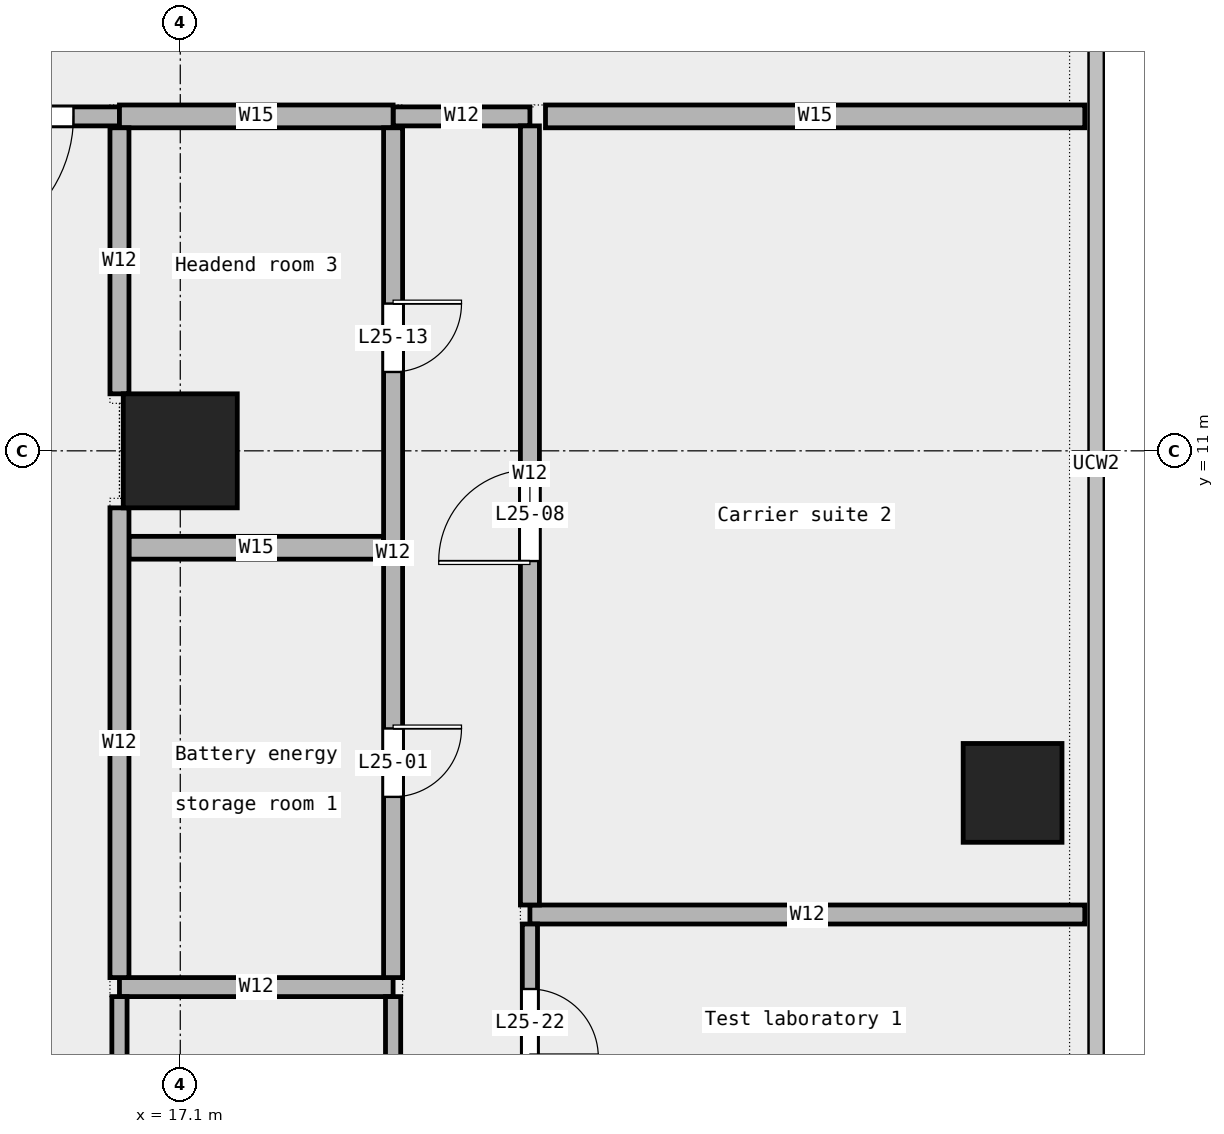
"""IFC4 building model, lengths in metres.
Left out: names, types, materials, properties, quantities, classifications, styles, units other than length and angle.
Written with IfcOpenShell. Run it as: python <this file> out.ifc"""

import sys

from ifc_helpers import new_model, si_unit, direction, frame, frame_2d, origin, origin_2d, place, context, subcontext, project, spatial, rectangle, extrude, element, fill, save


model = new_model("IFC4")
c1 = context("Model", 3, precision=1e-05, world=origin(), true_north=direction((0.0, 1.0)))
c2 = subcontext(c1, "Body", "Model", "MODEL_VIEW")
j1 = project(units=[si_unit("LENGTHUNIT", "METRE"), si_unit("PLANEANGLEUNIT", "RADIAN")], contexts=[c1])
p1 = place(None, origin())
s1 = spatial("IfcSite", under=j1, at=p1, CompositionType="ELEMENT")
p2 = place(p1, origin())
s2 = spatial("IfcBuilding", under=s1, at=p2, CompositionType="ELEMENT")
p3 = place(p2, frame((0.0, 0.0, 126.1)))
s3 = spatial("IfcBuildingStorey", under=s2, at=p3, CompositionType="ELEMENT", Elevation=126.1)
p4 = place(p3, frame((28.05, 6.5, 0.0), z_axis=(0.0, 0.0, 1.0), x_axis=(1.0, 0.0, 0.0)))
e1 = element("IfcColumn", 1, at=p4, inside=s3, PredefinedType="COLUMN", context=c2, shape_type="SweptSolid", body=[
    extrude(rectangle(XDim=1.3, YDim=1.3, at=origin_2d()), origin(), (0.0, 0.0, 1.0), 4.05),
])
p5 = place(p3, frame((17.1, 11.0, 0.0), z_axis=(0.0, 0.0, 1.0), x_axis=(1.0, 0.0, 0.0)))
e2 = element("IfcColumn", 2, at=p5, inside=s3, PredefinedType="COLUMN", context=c2, shape_type="SweptSolid", body=[
    extrude(rectangle(XDim=1.5, YDim=1.5, at=origin_2d()), origin(), (0.0, 0.0, 1.0), 4.05),
])
p6 = place(p3, frame((16.3, 3.945, 0.0), z_axis=(0.0, 0.0, 1.0), x_axis=(1.0, 0.0, 0.0)))
e3 = element("IfcWall", 3, at=p6, inside=s3, PredefinedType="PARTITIONING", context=c2, shape_type="SweptSolid", body=[
    extrude(rectangle(XDim=3.6, YDim=0.25, at=frame_2d((1.8, 0.0))), origin(), (0.0, 0.0, 1.0), 4.05),
])
p7 = place(p3, frame((21.7, 4.9, 0.0), z_axis=(0.0, 0.0, 1.0), x_axis=(1.0, 0.0, 0.0)))
e4 = element("IfcWall", 4, at=p7, inside=s3, PredefinedType="PARTITIONING", context=c2, shape_type="SweptSolid", body=[
    extrude(rectangle(XDim=7.3, YDim=0.25, at=frame_2d((3.65, 0.0))), origin(), (0.0, 0.0, 1.0), 4.05),
])
p8 = place(p3, frame((16.425, 9.725, 0.0), z_axis=(0.0, 0.0, 1.0), x_axis=(1.0, 0.0, 0.0)))
e5 = element("IfcWall", 5, at=p8, inside=s3, PredefinedType="PARTITIONING", context=c2, shape_type="SweptSolid", body=[
    extrude(rectangle(XDim=3.35, YDim=0.3, at=frame_2d((1.675, 0.0))), origin(), (0.0, 0.0, 1.0), 4.05),
])
p9 = place(p3, frame((13.29, 15.4, 0.0), z_axis=(0.0, 0.0, 1.0), x_axis=(1.0, 0.0, 0.0)))
e6 = element("IfcWall", 6, at=p9, inside=s3, PredefinedType="PARTITIONING", context=c2, shape_type="SweptSolid", body=[
    extrude(rectangle(XDim=3.01, YDim=0.25, at=frame_2d((1.505, 0.0))), origin(), (0.0, 0.0, 1.0), 4.05),
])
p10 = place(p9, frame((0.605, 0.0, 0.0)))
e7 = element("IfcOpeningElement", 7, at=p10, cuts=e6, PredefinedType="OPENING", context=c2, shape_type="SweptSolid", body=[
    extrude(rectangle(XDim=1.8, YDim=2.1, at=frame_2d((0.9, 1.05))), frame((0.0, 0.137, 0.0), z_axis=(0.0, -1.0, 0.0), x_axis=(1.0, 0.0, 0.0)), (0.0, 0.0, 1.0), 0.274),
])
p11 = place(p3, frame((19.9, 15.4, 0.0), z_axis=(0.0, 0.0, 1.0), x_axis=(1.0, 0.0, 0.0)))
e8 = element("IfcWall", 8, at=p11, inside=s3, PredefinedType="PARTITIONING", context=c2, shape_type="SweptSolid", body=[
    extrude(rectangle(XDim=1.8, YDim=0.25, at=frame_2d((0.9, 0.0))), origin(), (0.0, 0.0, 1.0), 4.05),
])
p12 = place(p3, frame((16.3, 15.4, 0.0), z_axis=(0.0, 0.0, 1.0), x_axis=(1.0, 0.0, 0.0)))
e9 = element("IfcWall", 9, at=p12, inside=s3, PredefinedType="PARTITIONING", context=c2, shape_type="SweptSolid", body=[
    extrude(rectangle(XDim=3.6, YDim=0.3, at=frame_2d((1.8, 0.0))), origin(), (0.0, 0.0, 1.0), 4.05),
])
p13 = place(p3, frame((21.905, 15.4, 0.0), z_axis=(0.0, 0.0, 1.0), x_axis=(1.0, 0.0, 0.0)))
e10 = element("IfcWall", 10, at=p13, inside=s3, PredefinedType="PARTITIONING", context=c2, shape_type="SweptSolid", body=[
    extrude(rectangle(XDim=7.095, YDim=0.3, at=frame_2d((3.547, 0.0))), origin(), (0.0, 0.0, 1.0), 4.05),
])
p14 = place(p3, frame((16.3, 0.75, 0.0), z_axis=(0.0, 0.0, 1.0), x_axis=(0.0, 1.0, 0.0)))
e11 = element("IfcWall", 11, at=p14, inside=s3, PredefinedType="PARTITIONING", context=c2, shape_type="SweptSolid", body=[
    extrude(rectangle(XDim=3.07, YDim=0.2, at=frame_2d((1.535, 0.0))), origin(), (0.0, 0.0, 1.0), 4.05),
])
p15 = place(p3, frame((16.3, 4.07, 0.0), z_axis=(0.0, 0.0, 1.0), x_axis=(0.0, 1.0, 0.0)))
e12 = element("IfcWall", 12, at=p15, inside=s3, PredefinedType="PARTITIONING", context=c2, shape_type="SweptSolid", body=[
    extrude(rectangle(XDim=6.18, YDim=0.25, at=frame_2d((3.09, 0.0))), origin(), (0.0, 0.0, 1.0), 4.05),
])
p16 = place(p3, frame((16.3, 11.75, 0.0), z_axis=(0.0, 0.0, 1.0), x_axis=(0.0, 1.0, 0.0)))
e13 = element("IfcWall", 13, at=p16, inside=s3, PredefinedType="PARTITIONING", context=c2, shape_type="SweptSolid", body=[
    extrude(rectangle(XDim=3.5, YDim=0.25, at=frame_2d((1.75, 0.0))), origin(), (0.0, 0.0, 1.0), 4.05),
])
p17 = place(p3, frame((19.9, -0.775, 0.0), z_axis=(0.0, 0.0, 1.0), x_axis=(0.0, 1.0, 0.0)))
e14 = element("IfcWall", 14, at=p17, inside=s3, PredefinedType="PARTITIONING", context=c2, shape_type="SweptSolid", body=[
    extrude(rectangle(XDim=4.595, YDim=0.2, at=frame_2d((2.297, 0.0))), origin(), (0.0, 0.0, 1.0), 4.05),
])
p18 = place(p17, frame((1.847, 0.0, 0.0)))
e15 = element("IfcOpeningElement", 15, at=p18, cuts=e14, PredefinedType="OPENING", context=c2, shape_type="SweptSolid", body=[
    extrude(rectangle(XDim=0.9, YDim=2.1, at=frame_2d((0.45, 1.05))), frame((0.0, 0.112, 0.0), z_axis=(0.0, -1.0, 0.0), x_axis=(1.0, 0.0, 0.0)), (0.0, 0.0, 1.0), 0.224),
])
p19 = place(p3, frame((19.9, 4.07, 0.0), z_axis=(0.0, 0.0, 1.0), x_axis=(0.0, 1.0, 0.0)))
e16 = element("IfcWall", 16, at=p19, inside=s3, PredefinedType="PARTITIONING", context=c2, shape_type="SweptSolid", body=[
    extrude(rectangle(XDim=11.18, YDim=0.25, at=frame_2d((5.59, 0.0))), origin(), (0.0, 0.0, 1.0), 4.05),
])
p20 = place(p19, frame((2.377, 0.0, 0.0)))
e17 = element("IfcOpeningElement", 17, at=p20, cuts=e16, PredefinedType="OPENING", context=c2, shape_type="SweptSolid", body=[
    extrude(rectangle(XDim=0.9, YDim=2.1, at=frame_2d((0.45, 1.05))), frame((0.0, 0.137, 0.0), z_axis=(0.0, -1.0, 0.0), x_axis=(1.0, 0.0, 0.0)), (0.0, 0.0, 1.0), 0.274),
])
p21 = place(p19, frame((7.968, 0.0, 0.0)))
e18 = element("IfcOpeningElement", 18, at=p21, cuts=e16, PredefinedType="OPENING", context=c2, shape_type="SweptSolid", body=[
    extrude(rectangle(XDim=0.9, YDim=2.1, at=frame_2d((0.45, 1.05))), frame((0.0, 0.137, 0.0), z_axis=(0.0, -1.0, 0.0), x_axis=(1.0, 0.0, 0.0)), (0.0, 0.0, 1.0), 0.274),
])
p22 = place(p3, frame((21.7, -9.0, 0.0), z_axis=(0.0, 0.0, 1.0), x_axis=(0.0, 1.0, 0.0)))
e19 = element("IfcWall", 19, at=p22, inside=s3, PredefinedType="PARTITIONING", context=c2, shape_type="SweptSolid", body=[
    extrude(rectangle(XDim=13.775, YDim=0.2, at=frame_2d((6.887, 0.0))), origin(), (0.0, 0.0, 1.0), 4.05),
])
p23 = place(p22, frame((4.833, 0.0, 0.0)))
e20 = element("IfcOpeningElement", 20, at=p23, cuts=e19, PredefinedType="OPENING", context=c2, shape_type="SweptSolid", body=[
    extrude(rectangle(XDim=1.5, YDim=2.1, at=frame_2d((0.75, 1.05))), frame((0.0, 0.112, 0.0), z_axis=(0.0, -1.0, 0.0), x_axis=(1.0, 0.0, 0.0)), (0.0, 0.0, 1.0), 0.224),
])
p24 = place(p22, frame((12.02, 0.0, 0.0)))
e21 = element("IfcOpeningElement", 21, at=p24, cuts=e19, PredefinedType="OPENING", context=c2, shape_type="SweptSolid", body=[
    extrude(rectangle(XDim=0.9, YDim=2.1, at=frame_2d((0.45, 1.05))), frame((0.0, 0.112, 0.0), z_axis=(0.0, -1.0, 0.0), x_axis=(1.0, 0.0, 0.0)), (0.0, 0.0, 1.0), 0.224),
])
p25 = place(p3, frame((21.7, 5.025, 0.0), z_axis=(0.0, 0.0, 1.0), x_axis=(0.0, 1.0, 0.0)))
e22 = element("IfcWall", 22, at=p25, inside=s3, PredefinedType="PARTITIONING", context=c2, shape_type="SweptSolid", body=[
    extrude(rectangle(XDim=10.25, YDim=0.25, at=frame_2d((5.125, 0.0))), origin(), (0.0, 0.0, 1.0), 4.05),
])
p26 = place(p25, frame((4.525, 0.0, 0.0)))
e23 = element("IfcOpeningElement", 23, at=p26, cuts=e22, PredefinedType="OPENING", context=c2, shape_type="SweptSolid", body=[
    extrude(rectangle(XDim=1.2, YDim=2.1, at=frame_2d((0.6, 1.05))), frame((0.0, 0.137, 0.0), z_axis=(0.0, -1.0, 0.0), x_axis=(1.0, 0.0, 0.0)), (0.0, 0.0, 1.0), 0.274),
])
p27 = place(p20, origin())
e24 = element("IfcDoor", 24, at=p27, inside=s3, OperationType="SINGLE_SWING_LEFT", PredefinedType="DOOR", context=c2, shape_type="SweptSolid", body=[
    extrude(rectangle(XDim=0.9, YDim=2.1, at=frame_2d((0.45, 1.05))), frame((0.0, 0.025, 0.0), z_axis=(0.0, -1.0, 0.0), x_axis=(1.0, 0.0, 0.0)), (0.0, 0.0, 1.0), 0.05),
])
fill(e17, e24)
p28 = place(p26, origin())
e25 = element("IfcDoor", 25, at=p28, inside=s3, OperationType="SINGLE_SWING_LEFT", PredefinedType="DOOR", context=c2, shape_type="SweptSolid", body=[
    extrude(rectangle(XDim=1.2, YDim=2.1, at=frame_2d((0.6, 1.05))), frame((0.0, 0.025, 0.0), z_axis=(0.0, -1.0, 0.0), x_axis=(1.0, 0.0, 0.0)), (0.0, 0.0, 1.0), 0.05),
])
fill(e23, e25)
p29 = place(p21, origin())
e26 = element("IfcDoor", 26, at=p29, inside=s3, OperationType="SINGLE_SWING_LEFT", PredefinedType="DOOR", context=c2, shape_type="SweptSolid", body=[
    extrude(rectangle(XDim=0.9, YDim=2.1, at=frame_2d((0.45, 1.05))), frame((0.0, 0.025, 0.0), z_axis=(0.0, -1.0, 0.0), x_axis=(1.0, 0.0, 0.0)), (0.0, 0.0, 1.0), 0.05),
])
fill(e18, e26)
p30 = place(p10, origin())
e27 = element("IfcDoor", 27, at=p30, inside=s3, OperationType="DOUBLE_DOOR_SINGLE_SWING", PredefinedType="DOOR", context=c2, shape_type="SweptSolid", body=[
    extrude(rectangle(XDim=1.8, YDim=2.1, at=frame_2d((0.9, 1.05))), frame((0.0, 0.025, 0.0), z_axis=(0.0, -1.0, 0.0), x_axis=(1.0, 0.0, 0.0)), (0.0, 0.0, 1.0), 0.05),
])
fill(e7, e27)
p31 = place(p24, origin())
e28 = element("IfcDoor", 28, at=p31, inside=s3, OperationType="SINGLE_SWING_RIGHT", PredefinedType="DOOR", context=c2, shape_type="SweptSolid", body=[
    extrude(rectangle(XDim=0.9, YDim=2.1, at=frame_2d((0.45, 1.05))), frame((0.0, 0.025, 0.0), z_axis=(0.0, -1.0, 0.0), x_axis=(1.0, 0.0, 0.0)), (0.0, 0.0, 1.0), 0.05),
])
fill(e21, e28)
save(model, sys.argv[1])
